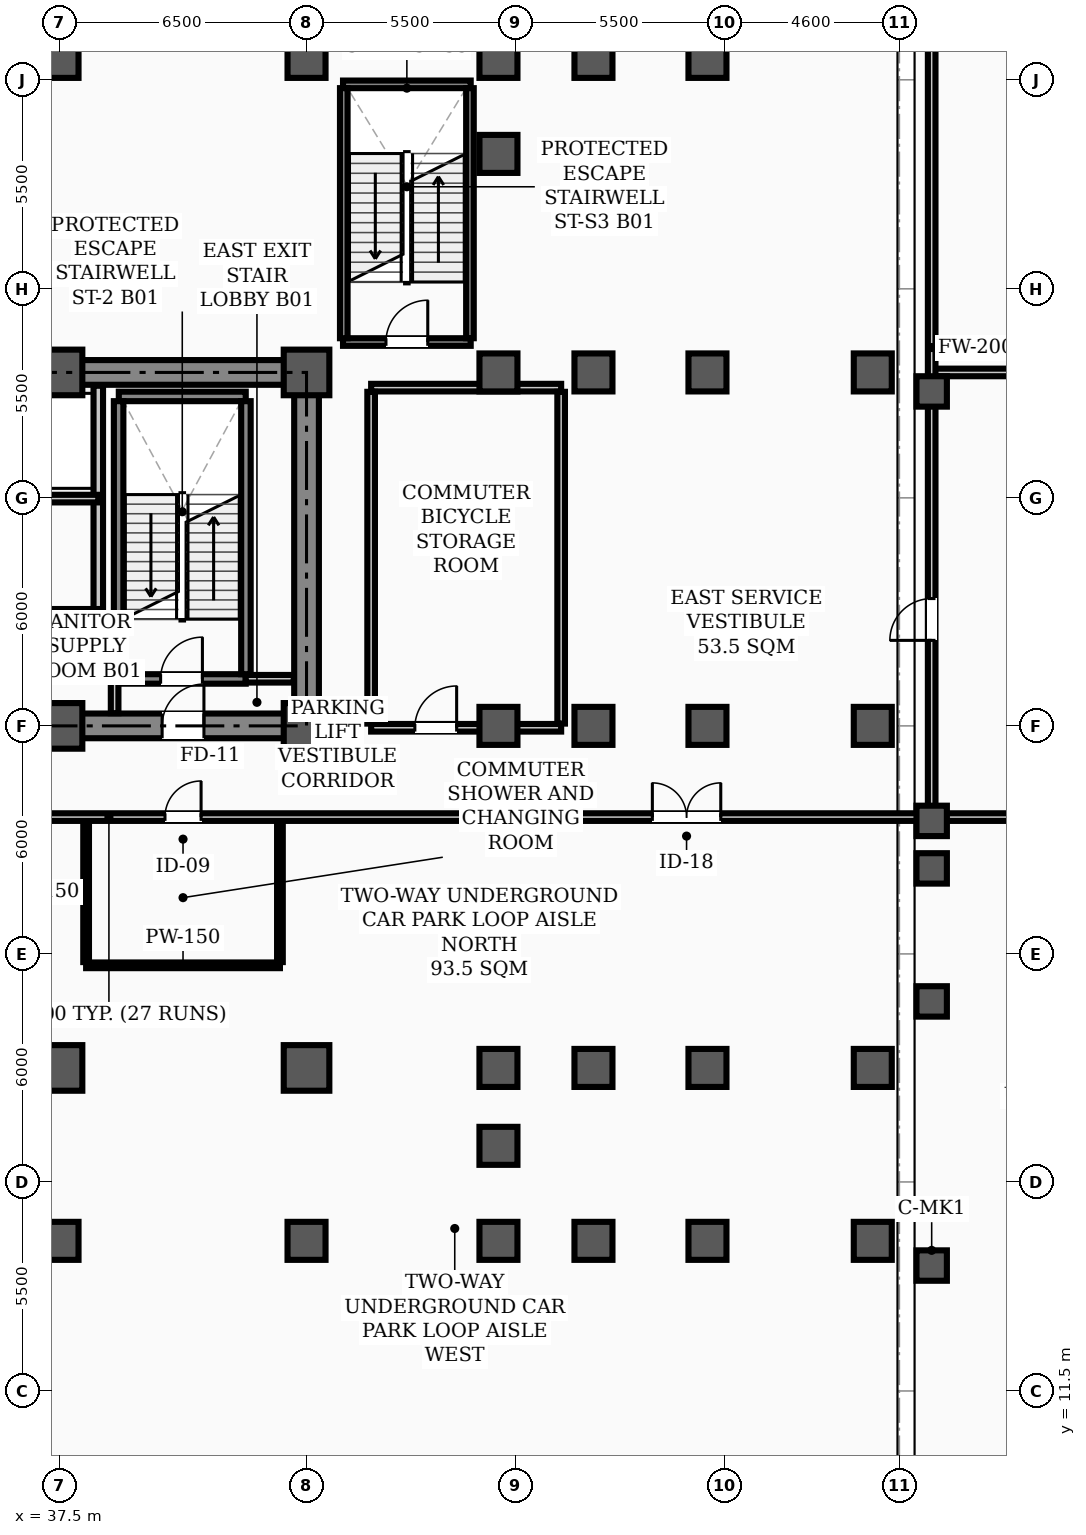
"""IFC4 building model, lengths in metres.
Left out: names, types, materials, properties, quantities, classifications, styles, units other than length and angle.
Written with IfcOpenShell. Run it as: python <this file> out.ifc"""

import sys

from ifc_helpers import new_model, si_unit, direction, frame, frame_2d, origin, origin_2d, place, context, subcontext, project, spatial, rectangle, hollow_rectangle, extrude, element, fill, save


model = new_model("IFC4")
c1 = context("Model", 3, precision=1e-05, world=origin(), true_north=direction((0.0, 1.0)))
c2 = subcontext(c1, "Body", "Model", "MODEL_VIEW")
j1 = project(units=[si_unit("LENGTHUNIT", "METRE"), si_unit("PLANEANGLEUNIT", "RADIAN")], contexts=[c1])
p1 = place(None, origin())
s1 = spatial("IfcSite", under=j1, at=p1, CompositionType="ELEMENT")
p2 = place(p1, origin())
s2 = spatial("IfcBuilding", under=s1, at=p2, CompositionType="ELEMENT")
p3 = place(p2, frame((0.0, 0.0, -5.0)))
s3 = spatial("IfcBuildingStorey", under=s2, at=p3, CompositionType="ELEMENT", Elevation=-5.0)
for number, where, z_axis, x_axis in (
    (1, (37.5, 29.0, 0.0), (0.0, 0.0, 1.0), (1.0, 0.0, 0.0)),
    (2, (37.5, 38.3, 0.0), (0.0, 0.0, 1.0), (1.0, 0.0, 0.0)),
    (3, (44.0, 29.0, 0.0), (0.0, 0.0, 1.0), (1.0, 0.0, 0.0)),
    (4, (44.0, 38.3, 0.0), (0.0, 0.0, 1.0), (1.0, 0.0, 0.0)),
    (5, (37.5, 20.0, 0.0), (0.0, 0.0, 1.0), (1.0, 0.0, 0.0)),
    (6, (44.0, 20.0, 0.0), (0.0, 0.0, 1.0), (1.0, 0.0, 0.0)),
):
    element("IfcColumn", number, at=place(p3, frame(where, z_axis=z_axis, x_axis=x_axis)), inside=s3, PredefinedType="COLUMN", context=c2, shape_type="SweptSolid", body=[
        extrude(hollow_rectangle(XDim=1.2, YDim=1.2, WallThickness=0.04, InnerFilletRadius=0.02, OuterFilletRadius=0.06, at=origin_2d()), origin(), (0.0, 0.0, 1.0), 5.0),
    ])
for number, where, z_axis, x_axis in (
    (7, (37.5, 15.45, 0.0), (0.0, 0.0, 1.0), (1.0, 0.0, 0.0)),
    (8, (37.5, 46.55, 0.0), (0.0, 0.0, 1.0), (1.0, 0.0, 0.0)),
    (9, (44.0, 15.45, 0.0), (0.0, 0.0, 1.0), (1.0, 0.0, 0.0)),
    (10, (44.0, 46.55, 0.0), (0.0, 0.0, 1.0), (1.0, 0.0, 0.0)),
    (11, (49.05, 15.45, 0.0), (0.0, 0.0, 1.0), (1.0, 0.0, 0.0)),
    (12, (49.05, 17.95, 0.0), (0.0, 0.0, 1.0), (1.0, 0.0, 0.0)),
    (13, (49.05, 20.0, 0.0), (0.0, 0.0, 1.0), (1.0, 0.0, 0.0)),
    (14, (49.05, 29.0, 0.0), (0.0, 0.0, 1.0), (1.0, 0.0, 0.0)),
    (15, (49.05, 38.3, 0.0), (0.0, 0.0, 1.0), (1.0, 0.0, 0.0)),
    (16, (49.05, 44.05, 0.0), (0.0, 0.0, 1.0), (1.0, 0.0, 0.0)),
    (17, (49.05, 46.55, 0.0), (0.0, 0.0, 1.0), (1.0, 0.0, 0.0)),
    (18, (51.55, 15.45, 0.0), (0.0, 0.0, 1.0), (1.0, 0.0, 0.0)),
    (19, (51.55, 20.0, 0.0), (0.0, 0.0, 1.0), (1.0, 0.0, 0.0)),
    (20, (51.55, 29.0, 0.0), (0.0, 0.0, 1.0), (1.0, 0.0, 0.0)),
    (21, (51.55, 38.3, 0.0), (0.0, 0.0, 1.0), (1.0, 0.0, 0.0)),
    (22, (51.55, 46.55, 0.0), (0.0, 0.0, 1.0), (1.0, 0.0, 0.0)),
    (23, (54.55, 15.45, 0.0), (0.0, 0.0, 1.0), (1.0, 0.0, 0.0)),
    (24, (54.55, 20.0, 0.0), (0.0, 0.0, 1.0), (1.0, 0.0, 0.0)),
    (25, (54.55, 29.0, 0.0), (0.0, 0.0, 1.0), (1.0, 0.0, 0.0)),
    (26, (54.55, 38.3, 0.0), (0.0, 0.0, 1.0), (1.0, 0.0, 0.0)),
    (27, (54.55, 46.55, 0.0), (0.0, 0.0, 1.0), (1.0, 0.0, 0.0)),
    (28, (58.9, 15.45, 0.0), (0.0, 0.0, 1.0), (1.0, 0.0, 0.0)),
    (29, (58.9, 20.0, 0.0), (0.0, 0.0, 1.0), (1.0, 0.0, 0.0)),
    (30, (58.9, 29.0, 0.0), (0.0, 0.0, 1.0), (1.0, 0.0, 0.0)),
    (31, (58.9, 38.3, 0.0), (0.0, 0.0, 1.0), (1.0, 0.0, 0.0)),
):
    element("IfcColumn", number, at=place(p3, frame(where, z_axis=z_axis, x_axis=x_axis)), inside=s3, PredefinedType="COLUMN", context=c2, shape_type="SweptSolid", body=[
        extrude(rectangle(XDim=1.0, YDim=1.0, at=origin_2d()), origin(), (0.0, 0.0, 1.0), 5.0),
    ])
for number, where, z_axis, x_axis in (
    (32, (60.45, 14.8, 0.0), (0.0, 0.0, 1.0), (1.0, 0.0, 0.0)),
    (33, (60.45, 21.75, 0.0), (0.0, 0.0, 1.0), (1.0, 0.0, 0.0)),
    (34, (60.45, 25.25, 0.0), (0.0, 0.0, 1.0), (1.0, 0.0, 0.0)),
    (35, (60.45, 26.5, 0.0), (0.0, 0.0, 1.0), (1.0, 0.0, 0.0)),
    (36, (60.45, 37.8, 0.0), (0.0, 0.0, 1.0), (1.0, 0.0, 0.0)),
):
    element("IfcColumn", number, at=place(p3, frame(where, z_axis=z_axis, x_axis=x_axis)), inside=s3, PredefinedType="COLUMN", context=c2, shape_type="SweptSolid", body=[
        extrude(rectangle(XDim=0.8, YDim=0.8, at=origin_2d()), origin(), (0.0, 0.0, 1.0), 5.0),
    ])
p4 = place(p3, frame((13.5, 29.0, 0.0), z_axis=(0.0, 0.0, 1.0), x_axis=(1.0, 0.0, 0.0)))
e37 = element("IfcWall", 37, at=p4, inside=s3, PredefinedType="SHEAR", context=c2, shape_type="SweptSolid", body=[
    extrude(rectangle(XDim=30.5, YDim=0.65, at=frame_2d((15.25, 0.0))), origin(), (0.0, 0.0, 1.0), 4.75),
])
p5 = place(p4, frame((1.75, 0.0, 0.0)))
e38 = element("IfcOpeningElement", 38, at=p5, cuts=e37, PredefinedType="OPENING", context=c2, shape_type="SweptSolid", body=[
    extrude(rectangle(XDim=1.1, YDim=2.08, at=frame_2d((0.55, 1.04))), frame((0.0, 0.335, 0.0), z_axis=(0.0, -1.0, 0.0), x_axis=(1.0, 0.0, 0.0)), (0.0, 0.0, 1.0), 0.67),
])
p6 = place(p4, frame((26.7, 0.0, 0.0)))
e39 = element("IfcOpeningElement", 39, at=p6, cuts=e37, PredefinedType="OPENING", context=c2, shape_type="SweptSolid", body=[
    extrude(rectangle(XDim=1.1, YDim=2.08, at=frame_2d((0.55, 1.04))), frame((0.0, 0.335, 0.0), z_axis=(0.0, -1.0, 0.0), x_axis=(1.0, 0.0, 0.0)), (0.0, 0.0, 1.0), 0.67),
])
p7 = place(p4, frame((6.8, 0.0, 0.0)))
e40 = element("IfcOpeningElement", 40, at=p7, cuts=e37, PredefinedType="OPENING", context=c2, shape_type="SweptSolid", body=[
    extrude(rectangle(XDim=1.1, YDim=2.08, at=frame_2d((0.55, 1.04))), frame((0.0, 0.335, 0.0), z_axis=(0.0, -1.0, 0.0), x_axis=(1.0, 0.0, 0.0)), (0.0, 0.0, 1.0), 0.67),
])
p8 = place(p4, frame((14.3, 0.0, 0.0)))
e41 = element("IfcOpeningElement", 41, at=p8, cuts=e37, PredefinedType="OPENING", context=c2, shape_type="SweptSolid", body=[
    extrude(rectangle(XDim=1.6, YDim=2.08, at=frame_2d((0.8, 1.04))), frame((0.0, 0.335, 0.0), z_axis=(0.0, -1.0, 0.0), x_axis=(1.0, 0.0, 0.0)), (0.0, 0.0, 1.0), 0.67),
])
p9 = place(p4, frame((19.5, 0.0, 0.0)))
e42 = element("IfcOpeningElement", 42, at=p9, cuts=e37, PredefinedType="OPENING", context=c2, shape_type="SweptSolid", body=[
    extrude(rectangle(XDim=0.9, YDim=2.08, at=frame_2d((0.45, 1.04))), frame((0.0, 0.335, 0.0), z_axis=(0.0, -1.0, 0.0), x_axis=(1.0, 0.0, 0.0)), (0.0, 0.0, 1.0), 0.67),
])
p10 = place(p4, frame((21.55, 0.0, 0.0)))
e43 = element("IfcOpeningElement", 43, at=p10, cuts=e37, PredefinedType="OPENING", context=c2, shape_type="SweptSolid", body=[
    extrude(rectangle(XDim=0.9, YDim=2.08, at=frame_2d((0.45, 1.04))), frame((0.0, 0.335, 0.0), z_axis=(0.0, -1.0, 0.0), x_axis=(1.0, 0.0, 0.0)), (0.0, 0.0, 1.0), 0.67),
])
p11 = place(p4, frame((12.1, 0.0, 0.0)))
e44 = element("IfcOpeningElement", 44, at=p11, cuts=e37, PredefinedType="OPENING", context=c2, shape_type="SweptSolid", body=[
    extrude(rectangle(XDim=1.3, YDim=2.08, at=frame_2d((0.65, 1.04))), frame((0.0, 0.335, 0.0), z_axis=(0.0, -1.0, 0.0), x_axis=(1.0, 0.0, 0.0)), (0.0, 0.0, 1.0), 0.67),
])
p12 = place(p3, frame((13.5, 38.3, 0.0), z_axis=(0.0, 0.0, 1.0), x_axis=(1.0, 0.0, 0.0)))
e45 = element("IfcWall", 45, at=p12, inside=s3, PredefinedType="SHEAR", context=c2, shape_type="SweptSolid", body=[
    extrude(rectangle(XDim=30.5, YDim=0.65, at=frame_2d((15.25, 0.0))), origin(), (0.0, 0.0, 1.0), 4.75),
])
p13 = place(p3, frame((44.0, 29.35, 0.0), z_axis=(0.0, 0.0, 1.0), x_axis=(0.0, 1.0, 0.0)))
e46 = element("IfcWall", 46, at=p13, inside=s3, PredefinedType="SHEAR", context=c2, shape_type="SweptSolid", body=[
    extrude(rectangle(XDim=8.6, YDim=0.65, at=frame_2d((4.3, 0.0))), origin(), (0.0, 0.0, 1.0), 4.75),
])
p14 = place(p3, frame((39.06, 30.235, 0.0), z_axis=(0.0, 0.0, 1.0), x_axis=(1.0, 0.0, 0.0)))
e47 = element("IfcWall", 47, at=p14, inside=s3, PredefinedType="STANDARD", context=c2, shape_type="SweptSolid", body=[
    extrude(rectangle(XDim=3.34, YDim=0.25, at=frame_2d((1.67, 0.0))), origin(), (0.0, 0.0, 1.0), 4.75),
])
p15 = place(p14, frame((1.1, 0.0, 0.0)))
e48 = element("IfcOpeningElement", 48, at=p15, cuts=e47, PredefinedType="OPENING", context=c2, shape_type="SweptSolid", body=[
    extrude(rectangle(XDim=1.1, YDim=2.08, at=frame_2d((0.55, 1.04))), frame((0.0, 0.135, 0.0), z_axis=(0.0, -1.0, 0.0), x_axis=(1.0, 0.0, 0.0)), (0.0, 0.0, 1.0), 0.27),
])
p16 = place(p3, frame((39.06, 37.669, 0.0), z_axis=(0.0, 0.0, 1.0), x_axis=(1.0, 0.0, 0.0)))
e49 = element("IfcWall", 49, at=p16, inside=s3, PredefinedType="STANDARD", context=c2, shape_type="SweptSolid", body=[
    extrude(rectangle(XDim=3.34, YDim=0.25, at=frame_2d((1.67, 0.0))), origin(), (0.0, 0.0, 1.0), 4.75),
])
for number, where, z_axis, x_axis in (
    (50, (39.055, 30.36, 0.0), (0.0, 0.0, 1.0), (0.0, 1.0, 0.0)),
    (51, (42.405, 30.36, 0.0), (0.0, 0.0, 1.0), (0.0, 1.0, 0.0)),
):
    element("IfcWall", number, at=place(p3, frame(where, z_axis=z_axis, x_axis=x_axis)), inside=s3, PredefinedType="STANDARD", context=c2, shape_type="SweptSolid", body=[
        extrude(rectangle(XDim=7.184, YDim=0.25, at=frame_2d((3.592, 0.0))), origin(), (0.0, 0.0, 1.0), 4.75),
    ])
p17 = place(p3, frame((38.52, 31.95, 0.0), z_axis=(0.0, 0.0, 1.0), x_axis=(0.0, 1.0, 0.0)))
e52 = element("IfcWall", 52, at=p17, inside=s3, PredefinedType="STANDARD", context=c2, shape_type="SweptSolid", body=[
    extrude(rectangle(XDim=6.0, YDim=0.25, at=frame_2d((3.0, 0.0))), origin(), (0.0, 0.0, 1.0), 3.63),
])
p18 = place(p3, frame((36.62, 31.95, 0.0), z_axis=(0.0, 0.0, 1.0), x_axis=(1.0, 0.0, 0.0)))
e53 = element("IfcWall", 53, at=p18, inside=s3, PredefinedType="STANDARD", context=c2, shape_type="SweptSolid", body=[
    extrude(rectangle(XDim=1.9, YDim=0.25, at=frame_2d((0.95, 0.0))), origin(), (0.0, 0.0, 1.0), 4.58),
])
p19 = place(p3, frame((44.96, 39.1, 0.0), z_axis=(0.0, 0.0, 1.0), x_axis=(1.0, 0.0, 0.0)))
e54 = element("IfcWall", 54, at=p19, inside=s3, PredefinedType="STANDARD", context=c2, shape_type="SweptSolid", body=[
    extrude(rectangle(XDim=3.36, YDim=0.2, at=frame_2d((1.68, 0.0))), origin(), (0.0, 0.0, 1.0), 4.75),
])
p20 = place(p19, frame((1.13, 0.0, 0.0)))
e55 = element("IfcOpeningElement", 55, at=p20, cuts=e54, PredefinedType="OPENING", context=c2, shape_type="SweptSolid", body=[
    extrude(rectangle(XDim=1.1, YDim=2.08, at=frame_2d((0.55, 1.04))), frame((0.0, 0.11, 0.0), z_axis=(0.0, -1.0, 0.0), x_axis=(1.0, 0.0, 0.0)), (0.0, 0.0, 1.0), 0.22),
])
p21 = place(p3, frame((44.96, 45.88, 0.0), z_axis=(0.0, 0.0, 1.0), x_axis=(1.0, 0.0, 0.0)))
e56 = element("IfcWall", 56, at=p21, inside=s3, PredefinedType="STANDARD", context=c2, shape_type="SweptSolid", body=[
    extrude(rectangle(XDim=3.36, YDim=0.2, at=frame_2d((1.68, 0.0))), origin(), (0.0, 0.0, 1.0), 4.75),
])
for number, where, z_axis, x_axis in (
    (57, (44.98, 39.2, 0.0), (0.0, 0.0, 1.0), (0.0, 1.0, 0.0)),
    (58, (48.3, 39.2, 0.0), (0.0, 0.0, 1.0), (0.0, 1.0, 0.0)),
):
    element("IfcWall", number, at=place(p3, frame(where, z_axis=z_axis, x_axis=x_axis)), inside=s3, PredefinedType="STANDARD", context=c2, shape_type="SweptSolid", body=[
        extrude(rectangle(XDim=6.58, YDim=0.2, at=frame_2d((3.29, 0.0))), origin(), (0.0, 0.0, 1.0), 4.75),
    ])
p22 = place(p3, frame((0.4, 26.6, 0.0), z_axis=(0.0, 0.0, 1.0), x_axis=(1.0, 0.0, 0.0)))
e59 = element("IfcWall", 59, at=p22, inside=s3, PredefinedType="STANDARD", context=c2, shape_type="SweptSolid", body=[
    extrude(rectangle(XDim=76.8, YDim=0.2, at=frame_2d((38.4, 0.0))), origin(), (0.0, 0.0, 1.0), 4.03),
])
p23 = place(p22, frame((26.55, 0.0, 0.0)))
e60 = element("IfcOpeningElement", 60, at=p23, cuts=e59, PredefinedType="OPENING", context=c2, shape_type="SweptSolid", body=[
    extrude(rectangle(XDim=1.1, YDim=2.08, at=frame_2d((0.55, 1.04))), frame((0.0, 0.11, 0.0), z_axis=(0.0, -1.0, 0.0), x_axis=(1.0, 0.0, 0.0)), (0.0, 0.0, 1.0), 0.22),
])
p24 = place(p22, frame((39.875, 0.0, 0.0)))
e61 = element("IfcOpeningElement", 61, at=p24, cuts=e59, PredefinedType="OPENING", context=c2, shape_type="SweptSolid", body=[
    extrude(rectangle(XDim=0.95, YDim=2.08, at=frame_2d((0.475, 1.04))), frame((0.0, 0.11, 0.0), z_axis=(0.0, -1.0, 0.0), x_axis=(1.0, 0.0, 0.0)), (0.0, 0.0, 1.0), 0.22),
])
p25 = place(p22, frame((52.7, 0.0, 0.0)))
e62 = element("IfcOpeningElement", 62, at=p25, cuts=e59, PredefinedType="OPENING", context=c2, shape_type="SweptSolid", body=[
    extrude(rectangle(XDim=1.8, YDim=2.08, at=frame_2d((0.9, 1.04))), frame((0.0, 0.11, 0.0), z_axis=(0.0, -1.0, 0.0), x_axis=(1.0, 0.0, 0.0)), (0.0, 0.0, 1.0), 0.22),
])
p26 = place(p3, frame((38.2, 22.7, 0.0), z_axis=(0.0, 0.0, 1.0), x_axis=(1.0, 0.0, 0.0)))
e63 = element("IfcWall", 63, at=p26, inside=s3, PredefinedType="PARTITIONING", context=c2, shape_type="SweptSolid", body=[
    extrude(rectangle(XDim=5.1, YDim=0.15, at=frame_2d((2.55, 0.0))), origin(), (0.0, 0.0, 1.0), 4.28),
])
p27 = place(p3, frame((45.7, 28.95, 0.0), z_axis=(0.0, 0.0, 1.0), x_axis=(1.0, 0.0, 0.0)))
e64 = element("IfcWall", 64, at=p27, inside=s3, PredefinedType="STANDARD", context=c2, shape_type="SweptSolid", body=[
    extrude(rectangle(XDim=5.0, YDim=0.2, at=frame_2d((2.5, 0.0))), origin(), (0.0, 0.0, 1.0), 3.63),
])
p28 = place(p27, frame((1.15, 0.0, 0.0)))
e65 = element("IfcOpeningElement", 65, at=p28, cuts=e64, PredefinedType="OPENING", context=c2, shape_type="SweptSolid", body=[
    extrude(rectangle(XDim=1.1, YDim=2.08, at=frame_2d((0.55, 1.04))), frame((0.0, 0.11, 0.0), z_axis=(0.0, -1.0, 0.0), x_axis=(1.0, 0.0, 0.0)), (0.0, 0.0, 1.0), 0.22),
])
p29 = place(p3, frame((45.7, 37.9, 0.0), z_axis=(0.0, 0.0, 1.0), x_axis=(1.0, 0.0, 0.0)))
e66 = element("IfcWall", 66, at=p29, inside=s3, PredefinedType="STANDARD", context=c2, shape_type="SweptSolid", body=[
    extrude(rectangle(XDim=5.0, YDim=0.2, at=frame_2d((2.5, 0.0))), origin(), (0.0, 0.0, 1.0), 3.63),
])
p30 = place(p3, frame((60.45, 38.3, 0.0), z_axis=(0.0, 0.0, 1.0), x_axis=(1.0, 0.0, 0.0)))
e67 = element("IfcWall", 67, at=p30, inside=s3, PredefinedType="STANDARD", context=c2, shape_type="SweptSolid", body=[
    extrude(rectangle(XDim=12.59, YDim=0.2, at=frame_2d((6.295, 0.0))), origin(), (0.0, 0.0, 1.0), 4.03),
])
p31 = place(p30, frame((4.15, 0.0, 0.0)))
e68 = element("IfcOpeningElement", 68, at=p31, cuts=e67, PredefinedType="OPENING", context=c2, shape_type="SweptSolid", body=[
    extrude(rectangle(XDim=1.8, YDim=2.08, at=frame_2d((0.9, 1.04))), frame((0.0, 0.11, 0.0), z_axis=(0.0, -1.0, 0.0), x_axis=(1.0, 0.0, 0.0)), (0.0, 0.0, 1.0), 0.22),
])
p32 = place(p3, frame((42.4, 30.24, 0.0), z_axis=(0.0, 0.0, 1.0), x_axis=(1.0, 0.0, 0.0)))
e69 = element("IfcWall", 69, at=p32, inside=s3, PredefinedType="STANDARD", context=c2, shape_type="SweptSolid", body=[
    extrude(rectangle(XDim=1.265, YDim=0.2, at=frame_2d((0.633, 0.0))), origin(), (0.0, 0.0, 1.0), 4.03),
])
for number, where, z_axis, x_axis in (
    (70, (38.2, 22.785, 0.0), (0.0, 0.0, 1.0), (0.0, 1.0, 0.0)),
    (71, (43.3, 22.785, 0.0), (0.0, 0.0, 1.0), (0.0, 1.0, 0.0)),
):
    element("IfcWall", number, at=place(p3, frame(where, z_axis=z_axis, x_axis=x_axis)), inside=s3, PredefinedType="PARTITIONING", context=c2, shape_type="SweptSolid", body=[
        extrude(rectangle(XDim=3.705, YDim=0.15, at=frame_2d((1.853, 0.0))), origin(), (0.0, 0.0, 1.0), 4.75),
    ])
for number, where, z_axis, x_axis in (
    (72, (45.7, 29.06, 0.0), (0.0, 0.0, 1.0), (0.0, 1.0, 0.0)),
    (73, (50.7, 29.06, 0.0), (0.0, 0.0, 1.0), (0.0, 1.0, 0.0)),
):
    element("IfcWall", number, at=place(p3, frame(where, z_axis=z_axis, x_axis=x_axis)), inside=s3, PredefinedType="STANDARD", context=c2, shape_type="SweptSolid", body=[
        extrude(rectangle(XDim=8.73, YDim=0.2, at=frame_2d((4.365, 0.0))), origin(), (0.0, 0.0, 1.0), 3.63),
    ])
p33 = place(p3, frame((60.45, 26.71, 0.0), z_axis=(0.0, 0.0, 1.0), x_axis=(0.0, 1.0, 0.0)))
e74 = element("IfcWall", 74, at=p33, inside=s3, PredefinedType="STANDARD", context=c2, shape_type="SweptSolid", body=[
    extrude(rectangle(XDim=24.49, YDim=0.2, at=frame_2d((12.245, 0.0))), origin(), (0.0, 0.0, 1.0), 4.03),
])
p34 = place(p33, frame((4.54, 0.0, 0.0)))
e75 = element("IfcOpeningElement", 75, at=p34, cuts=e74, PredefinedType="OPENING", context=c2, shape_type="SweptSolid", body=[
    extrude(rectangle(XDim=1.1, YDim=2.08, at=frame_2d((0.55, 1.04))), frame((0.0, 0.11, 0.0), z_axis=(0.0, -1.0, 0.0), x_axis=(1.0, 0.0, 0.0)), (0.0, 0.0, 1.0), 0.22),
])
p35 = place(p3, frame((38.95, 29.335, 0.0), z_axis=(0.0, 0.0, 1.0), x_axis=(0.0, 1.0, 0.0)))
e76 = element("IfcWall", 76, at=p35, inside=s3, PredefinedType="STANDARD", context=c2, shape_type="SweptSolid", body=[
    extrude(rectangle(XDim=0.965, YDim=0.2, at=frame_2d((0.482, 0.0))), origin(), (0.0, 0.0, 1.0), 3.63),
])
p36 = place(p3, frame((36.62, 34.98, 0.0), z_axis=(0.0, 0.0, 1.0), x_axis=(1.0, 0.0, 0.0)))
e77 = element("IfcWall", 77, at=p36, inside=s3, PredefinedType="STANDARD", context=c2, shape_type="SweptSolid", body=[
    extrude(rectangle(XDim=1.9, YDim=0.2, at=frame_2d((0.95, 0.0))), origin(), (0.0, 0.0, 1.0), 4.75),
])
p37 = place(p15, origin())
e78 = element("IfcDoor", 78, at=p37, inside=s3, OperationType="SINGLE_SWING_RIGHT", PredefinedType="DOOR", context=c2, shape_type="SweptSolid", body=[
    extrude(rectangle(XDim=1.1, YDim=2.08, at=frame_2d((0.55, 1.04))), frame((0.0, 0.025, 0.0), z_axis=(0.0, -1.0, 0.0), x_axis=(1.0, 0.0, 0.0)), (0.0, 0.0, 1.0), 0.05),
])
fill(e48, e78)
p38 = place(p20, origin())
e79 = element("IfcDoor", 79, at=p38, inside=s3, OperationType="SINGLE_SWING_RIGHT", PredefinedType="DOOR", context=c2, shape_type="SweptSolid", body=[
    extrude(rectangle(XDim=1.1, YDim=2.08, at=frame_2d((0.55, 1.04))), frame((0.0, 0.025, 0.0), z_axis=(0.0, -1.0, 0.0), x_axis=(1.0, 0.0, 0.0)), (0.0, 0.0, 1.0), 0.05),
])
fill(e55, e79)
p39 = place(p24, origin())
e80 = element("IfcDoor", 80, at=p39, inside=s3, OperationType="SINGLE_SWING_RIGHT", PredefinedType="DOOR", context=c2, shape_type="SweptSolid", body=[
    extrude(rectangle(XDim=0.95, YDim=2.08, at=frame_2d((0.475, 1.04))), frame((0.0, 0.025, 0.0), z_axis=(0.0, -1.0, 0.0), x_axis=(1.0, 0.0, 0.0)), (0.0, 0.0, 1.0), 0.05),
])
fill(e61, e80)
p40 = place(p25, origin())
e81 = element("IfcDoor", 81, at=p40, inside=s3, OperationType="DOUBLE_DOOR_SINGLE_SWING", PredefinedType="DOOR", context=c2, shape_type="SweptSolid", body=[
    extrude(rectangle(XDim=1.8, YDim=2.08, at=frame_2d((0.9, 1.04))), frame((0.0, 0.025, 0.0), z_axis=(0.0, -1.0, 0.0), x_axis=(1.0, 0.0, 0.0)), (0.0, 0.0, 1.0), 0.05),
])
fill(e62, e81)
p41 = place(p28, origin())
e82 = element("IfcDoor", 82, at=p41, inside=s3, OperationType="SINGLE_SWING_RIGHT", PredefinedType="DOOR", context=c2, shape_type="SweptSolid", body=[
    extrude(rectangle(XDim=1.1, YDim=2.08, at=frame_2d((0.55, 1.04))), frame((0.0, 0.025, 0.0), z_axis=(0.0, -1.0, 0.0), x_axis=(1.0, 0.0, 0.0)), (0.0, 0.0, 1.0), 0.05),
])
fill(e65, e82)
p42 = place(p34, origin())
e83 = element("IfcDoor", 83, at=p42, inside=s3, OperationType="SINGLE_SWING_LEFT", PredefinedType="DOOR", context=c2, shape_type="SweptSolid", body=[
    extrude(rectangle(XDim=1.1, YDim=2.08, at=frame_2d((0.55, 1.04))), frame((0.0, 0.025, 0.0), z_axis=(0.0, -1.0, 0.0), x_axis=(1.0, 0.0, 0.0)), (0.0, 0.0, 1.0), 0.05),
])
fill(e75, e83)
p43 = place(p6, origin())
e84 = element("IfcDoor", 84, at=p43, inside=s3, OperationType="SINGLE_SWING_RIGHT", PredefinedType="DOOR", context=c2, shape_type="SweptSolid", body=[
    extrude(rectangle(XDim=1.1, YDim=2.08, at=frame_2d((0.55, 1.04))), frame((0.0, 0.025, 0.0), z_axis=(0.0, -1.0, 0.0), x_axis=(1.0, 0.0, 0.0)), (0.0, 0.0, 1.0), 0.05),
])
fill(e39, e84)
save(model, sys.argv[1])
